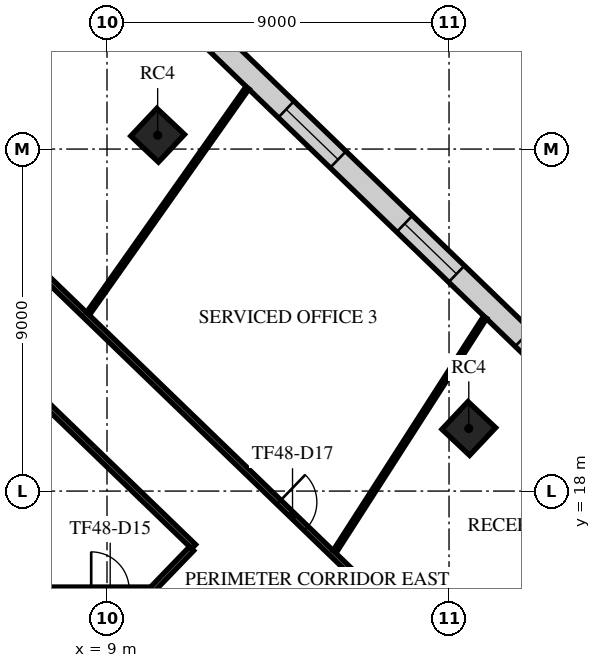
"""IFC4 building model, lengths in metres.
Left out: names, types, materials, properties, quantities, classifications, styles, units other than length and angle.
Written with IfcOpenShell. Run it as: python <this file> out.ifc"""

import sys

from ifc_helpers import new_model, si_unit, direction, frame, frame_2d, origin, origin_2d, place, context, subcontext, project, spatial, rectangle, extrude, element, fill, save


model = new_model("IFC4")
c1 = context("Model", 3, precision=1e-05, world=origin(), true_north=direction((0.0, 1.0)))
c2 = subcontext(c1, "Body", "Model", "MODEL_VIEW")
j1 = project(units=[si_unit("LENGTHUNIT", "METRE"), si_unit("PLANEANGLEUNIT", "RADIAN")], contexts=[c1])
p1 = place(None, origin())
s1 = spatial("IfcSite", under=j1, at=p1, CompositionType="ELEMENT")
p2 = place(p1, origin())
s2 = spatial("IfcBuilding", under=s1, at=p2, CompositionType="ELEMENT")
p3 = place(p2, frame((0.0, 0.0, 205.3)))
s3 = spatial("IfcBuildingStorey", under=s2, at=p3, CompositionType="ELEMENT", Elevation=205.3)
for number, where, z_axis, x_axis in (
    (1, (18.52, 19.647, 0.0), (0.0, 0.0, 1.0), (0.686, 0.728, 0.0)),
    (2, (10.333, 27.364, 0.0), (0.0, 0.0, 1.0), (0.686, 0.728, 0.0)),
):
    element("IfcColumn", number, at=place(p3, frame(where, z_axis=z_axis, x_axis=x_axis)), inside=s3, PredefinedType="COLUMN", context=c2, shape_type="SweptSolid", body=[
        extrude(rectangle(XDim=1.0, YDim=1.0, at=origin_2d()), origin(), (0.0, 0.0, 1.0), 4.0),
    ])
p4 = place(p3, frame((34.658, 7.819, 0.0), z_axis=(0.0, 0.0, 1.0), x_axis=(-0.719340729741, 0.694657408034, 0.0)))
e3 = element("IfcWall", 3, at=p4, inside=s3, PredefinedType="STANDARD", context=c2, shape_type="SweptSolid", body=[
    extrude(rectangle(XDim=39.0, YDim=0.6, at=frame_2d((19.5, 0.0))), origin(), (0.0, 0.0, 1.0), 3.62),
])
p5 = place(p4, frame((1.217, 0.0, 0.9)))
e4 = element("IfcOpeningElement", 4, at=p5, cuts=e3, PredefinedType="OPENING", context=c2, shape_type="SweptSolid", body=[
    extrude(rectangle(XDim=1.9, YDim=2.1, at=frame_2d((0.95, 1.05))), frame((0.0, 0.31, 0.0), z_axis=(0.0, -1.0, 0.0), x_axis=(1.0, 0.0, 0.0)), (0.0, 0.0, 1.0), 0.62),
])
p6 = place(p4, frame((5.55, 0.0, 0.9)))
e5 = element("IfcOpeningElement", 5, at=p6, cuts=e3, PredefinedType="OPENING", context=c2, shape_type="SweptSolid", body=[
    extrude(rectangle(XDim=1.9, YDim=2.1, at=frame_2d((0.95, 1.05))), frame((0.0, 0.31, 0.0), z_axis=(0.0, -1.0, 0.0), x_axis=(1.0, 0.0, 0.0)), (0.0, 0.0, 1.0), 0.62),
])
p7 = place(p4, frame((9.883, 0.0, 0.9)))
e6 = element("IfcOpeningElement", 6, at=p7, cuts=e3, PredefinedType="OPENING", context=c2, shape_type="SweptSolid", body=[
    extrude(rectangle(XDim=1.9, YDim=2.1, at=frame_2d((0.95, 1.05))), frame((0.0, 0.31, 0.0), z_axis=(0.0, -1.0, 0.0), x_axis=(1.0, 0.0, 0.0)), (0.0, 0.0, 1.0), 0.62),
])
p8 = place(p4, frame((14.217, 0.0, 0.9)))
e7 = element("IfcOpeningElement", 7, at=p8, cuts=e3, PredefinedType="OPENING", context=c2, shape_type="SweptSolid", body=[
    extrude(rectangle(XDim=1.9, YDim=2.1, at=frame_2d((0.95, 1.05))), frame((0.0, 0.31, 0.0), z_axis=(0.0, -1.0, 0.0), x_axis=(1.0, 0.0, 0.0)), (0.0, 0.0, 1.0), 0.62),
])
p9 = place(p4, frame((18.55, 0.0, 0.9)))
e8 = element("IfcOpeningElement", 8, at=p9, cuts=e3, PredefinedType="OPENING", context=c2, shape_type="SweptSolid", body=[
    extrude(rectangle(XDim=1.9, YDim=2.1, at=frame_2d((0.95, 1.05))), frame((0.0, 0.31, 0.0), z_axis=(0.0, -1.0, 0.0), x_axis=(1.0, 0.0, 0.0)), (0.0, 0.0, 1.0), 0.62),
])
p10 = place(p4, frame((22.883, 0.0, 0.9)))
e9 = element("IfcOpeningElement", 9, at=p10, cuts=e3, PredefinedType="OPENING", context=c2, shape_type="SweptSolid", body=[
    extrude(rectangle(XDim=1.9, YDim=2.1, at=frame_2d((0.95, 1.05))), frame((0.0, 0.31, 0.0), z_axis=(0.0, -1.0, 0.0), x_axis=(1.0, 0.0, 0.0)), (0.0, 0.0, 1.0), 0.62),
])
p11 = place(p4, frame((27.217, 0.0, 0.9)))
e10 = element("IfcOpeningElement", 10, at=p11, cuts=e3, PredefinedType="OPENING", context=c2, shape_type="SweptSolid", body=[
    extrude(rectangle(XDim=1.9, YDim=2.1, at=frame_2d((0.95, 1.05))), frame((0.0, 0.31, 0.0), z_axis=(0.0, -1.0, 0.0), x_axis=(1.0, 0.0, 0.0)), (0.0, 0.0, 1.0), 0.62),
])
p12 = place(p4, frame((31.55, 0.0, 0.9)))
e11 = element("IfcOpeningElement", 11, at=p12, cuts=e3, PredefinedType="OPENING", context=c2, shape_type="SweptSolid", body=[
    extrude(rectangle(XDim=1.9, YDim=2.1, at=frame_2d((0.95, 1.05))), frame((0.0, 0.31, 0.0), z_axis=(0.0, -1.0, 0.0), x_axis=(1.0, 0.0, 0.0)), (0.0, 0.0, 1.0), 0.62),
])
p13 = place(p4, frame((35.883, 0.0, 0.9)))
e12 = element("IfcOpeningElement", 12, at=p13, cuts=e3, PredefinedType="OPENING", context=c2, shape_type="SweptSolid", body=[
    extrude(rectangle(XDim=1.9, YDim=2.1, at=frame_2d((0.95, 1.05))), frame((0.0, 0.31, 0.0), z_axis=(0.0, -1.0, 0.0), x_axis=(1.0, 0.0, 0.0)), (0.0, 0.0, 1.0), 0.62),
])
p14 = place(p3, frame((-8.737, 15.4, 0.0), z_axis=(0.0, 0.0, 1.0), x_axis=(1.0, 0.0, 0.0)))
e13 = element("IfcWall", 13, at=p14, inside=s3, PredefinedType="PARTITIONING", context=c2, shape_type="SweptSolid", body=[
    extrude(rectangle(XDim=18.916, YDim=0.15, at=frame_2d((9.458, 0.0))), origin(), (0.0, 0.0, 1.0), 3.17),
])
p15 = place(p14, frame((17.321, 0.0, 0.0)))
e14 = element("IfcOpeningElement", 14, at=p15, cuts=e13, PredefinedType="OPENING", context=c2, shape_type="SweptSolid", body=[
    extrude(rectangle(XDim=1.0, YDim=2.1, at=frame_2d((0.5, 1.05))), frame((0.0, 0.085, 0.0), z_axis=(0.0, -1.0, 0.0), x_axis=(1.0, 0.0, 0.0)), (0.0, 0.0, 1.0), 0.17),
])
p16 = place(p3, frame((3.93, 23.636, 0.0), z_axis=(0.0, 0.0, 1.0), x_axis=(0.719341752701, -0.694656348723, 0.0)))
e15 = element("IfcWall", 15, at=p16, inside=s3, PredefinedType="PARTITIONING", context=c2, shape_type="SweptSolid", body=[
    extrude(rectangle(XDim=10.217, YDim=0.15, at=frame_2d((5.108, 0.0))), origin(), (0.0, 0.0, 1.0), 3.17),
])
p17 = place(p16, frame((0.8, 0.0, 0.0)))
e16 = element("IfcOpeningElement", 16, at=p17, cuts=e15, PredefinedType="OPENING", context=c2, shape_type="SweptSolid", body=[
    extrude(rectangle(XDim=1.8, YDim=2.1, at=frame_2d((0.9, 1.05))), frame((0.0, 0.085, 0.0), z_axis=(0.0, -1.0, 0.0), x_axis=(1.0, 0.0, 0.0)), (0.0, 0.0, 1.0), 0.17),
])
p18 = place(p3, frame((5.597, 25.362, 0.0), z_axis=(0.0, 0.0, 1.0), x_axis=(0.719350067003, -0.69464773886, 0.0)))
e17 = element("IfcWall", 17, at=p18, inside=s3, PredefinedType="PARTITIONING", context=c2, shape_type="SweptSolid", body=[
    extrude(rectangle(XDim=27.258, YDim=0.15, at=frame_2d((13.629, 0.0))), origin(), (0.0, 0.0, 1.0), 3.17),
])
p19 = place(p18, frame((11.017, 0.0, 0.0)))
e18 = element("IfcOpeningElement", 18, at=p19, cuts=e17, PredefinedType="OPENING", context=c2, shape_type="SweptSolid", body=[
    extrude(rectangle(XDim=1.0, YDim=2.1, at=frame_2d((0.5, 1.05))), frame((0.0, 0.085, 0.0), z_axis=(0.0, -1.0, 0.0), x_axis=(1.0, 0.0, 0.0)), (0.0, 0.0, 1.0), 0.17),
])
p20 = place(p18, frame((16.287, 0.0, 0.0)))
e19 = element("IfcOpeningElement", 19, at=p20, cuts=e17, PredefinedType="OPENING", context=c2, shape_type="SweptSolid", body=[
    extrude(rectangle(XDim=1.0, YDim=2.1, at=frame_2d((0.5, 1.05))), frame((0.0, 0.085, 0.0), z_axis=(0.0, -1.0, 0.0), x_axis=(1.0, 0.0, 0.0)), (0.0, 0.0, 1.0), 0.17),
])
p21 = place(p18, frame((24.435, 0.0, 0.0)))
e20 = element("IfcOpeningElement", 20, at=p21, cuts=e17, PredefinedType="OPENING", context=c2, shape_type="SweptSolid", body=[
    extrude(rectangle(XDim=1.8, YDim=2.1, at=frame_2d((0.9, 1.05))), frame((0.0, 0.085, 0.0), z_axis=(0.0, -1.0, 0.0), x_axis=(1.0, 0.0, 0.0)), (0.0, 0.0, 1.0), 0.17),
])
p22 = place(p3, frame((10.18, 15.4, 0.0), z_axis=(0.0, 0.0, 1.0), x_axis=(0.694282379976, 0.719702700325, 0.0)))
e21 = element("IfcWall", 21, at=p22, inside=s3, PredefinedType="PARTITIONING", context=c2, shape_type="SweptSolid", body=[
    extrude(rectangle(XDim=1.508, YDim=0.15, at=frame_2d((0.754, 0.0))), origin(), (0.0, 0.0, 1.0), 3.17),
])
p23 = place(p3, frame((8.503, 22.67, 0.0), z_axis=(0.0, 0.0, 1.0), x_axis=(0.576640998349, 0.816997649338, 0.0)))
e22 = element("IfcWall", 22, at=p23, inside=s3, PredefinedType="PARTITIONING", context=c2, shape_type="SweptSolid", body=[
    extrude(rectangle(XDim=7.269, YDim=0.1, at=frame_2d((3.634, 0.0))), origin(), (0.0, 0.0, 1.0), 2.97),
])
p24 = place(p3, frame((14.992, 16.408, 0.0), z_axis=(0.0, 0.0, 1.0), x_axis=(0.54025368273, 0.841502203382, 0.0)))
e23 = element("IfcWall", 23, at=p24, inside=s3, PredefinedType="PARTITIONING", context=c2, shape_type="SweptSolid", body=[
    extrude(rectangle(XDim=7.323, YDim=0.1, at=frame_2d((3.662, 0.0))), origin(), (0.0, 0.0, 1.0), 2.97),
])
p25 = place(p10, origin())
e24 = element("IfcWindow", 24, at=p25, inside=s3, PartitioningType="SINGLE_PANEL", PredefinedType="WINDOW", context=c2, shape_type="SweptSolid", body=[
    extrude(rectangle(XDim=1.9, YDim=2.1, at=frame_2d((0.95, 1.05))), frame((0.0, 0.03, 0.0), z_axis=(0.0, -1.0, 0.0), x_axis=(1.0, 0.0, 0.0)), (0.0, 0.0, 1.0), 0.06),
])
fill(e9, e24)
p26 = place(p11, origin())
e25 = element("IfcWindow", 25, at=p26, inside=s3, PartitioningType="SINGLE_PANEL", PredefinedType="WINDOW", context=c2, shape_type="SweptSolid", body=[
    extrude(rectangle(XDim=1.9, YDim=2.1, at=frame_2d((0.95, 1.05))), frame((0.0, 0.03, 0.0), z_axis=(0.0, -1.0, 0.0), x_axis=(1.0, 0.0, 0.0)), (0.0, 0.0, 1.0), 0.06),
])
fill(e10, e25)
p27 = place(p19, origin())
e26 = element("IfcDoor", 26, at=p27, inside=s3, OperationType="SINGLE_SWING_LEFT", PredefinedType="DOOR", context=c2, shape_type="SweptSolid", body=[
    extrude(rectangle(XDim=1.0, YDim=2.1, at=frame_2d((0.5, 1.05))), frame((0.0, 0.025, 0.0), z_axis=(0.0, -1.0, 0.0), x_axis=(1.0, 0.0, 0.0)), (0.0, 0.0, 1.0), 0.05),
])
fill(e18, e26)
save(model, sys.argv[1])
